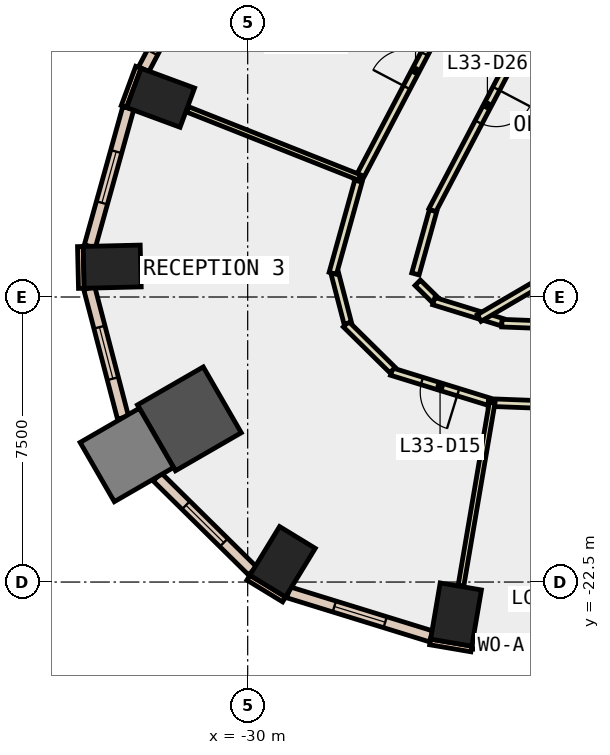
"""IFC4 building model, lengths in metres.
Left out: names, types, materials, properties, quantities, classifications, styles, units other than length and angle.
Written with IfcOpenShell. Run it as: python <this file> out.ifc"""

import sys

from ifc_helpers import new_model, si_unit, direction, frame, frame_2d, origin, origin_2d, place, context, subcontext, project, spatial, rectangle, extrude, element, fill, save


model = new_model("IFC4")
c1 = context("Model", 3, precision=1e-05, world=origin(), true_north=direction((0.0, 1.0)))
c2 = subcontext(c1, "Body", "Model", "MODEL_VIEW")
j1 = project(units=[si_unit("LENGTHUNIT", "METRE"), si_unit("PLANEANGLEUNIT", "RADIAN")], contexts=[c1])
p1 = place(None, origin())
s1 = spatial("IfcSite", under=j1, at=p1, CompositionType="ELEMENT")
p2 = place(p1, origin())
s2 = spatial("IfcBuilding", under=s1, at=p2, CompositionType="ELEMENT")
p3 = place(p2, frame((0.0, 0.0, 150.8)))
s3 = spatial("IfcBuildingStorey", under=s2, at=p3, CompositionType="ELEMENT", Elevation=150.8)
for number, where, z_axis, x_axis in (
    (1, (-24.518, -23.355, -0.4), (0.0, 0.0, 1.0), (-0.986, 0.168, 0.0)),
    (2, (-32.292, -9.758, -0.4), (0.0, 0.0, 1.0), (0.347, 0.938, 0.0)),
    (3, (-33.565, -14.202, -0.4), (0.0, 0.0, 1.0), (-0.024, 1.0, 0.0)),
):
    element("IfcColumn", number, at=place(p3, frame(where, z_axis=z_axis, x_axis=x_axis)), inside=s3, PredefinedType="COLUMN", context=c2, shape_type="SweptSolid", body=[
        extrude(rectangle(XDim=1.1, YDim=1.5, at=origin_2d()), origin(), (0.0, 0.0, 1.0), 4.2),
    ])
p4 = place(p3, frame((-31.535, -18.206, -0.4), z_axis=(0.0, 0.0, 1.0), x_axis=(0.866025403784, 0.5, 0.0)))
e4 = element("IfcColumn", 4, at=p4, inside=s3, PredefinedType="COLUMN", context=c2, shape_type="SweptSolid", body=[
    extrude(rectangle(XDim=2.0, YDim=2.0, at=origin_2d()), origin(), (0.0, 0.0, 1.0), 4.2),
])
p5 = place(p3, frame((-29.082, -21.967, -0.4), z_axis=(0.0, 0.0, 1.0), x_axis=(-0.853714435155, 0.520741455243, 0.0)))
e5 = element("IfcColumn", 5, at=p5, inside=s3, PredefinedType="COLUMN", context=c2, shape_type="SweptSolid", body=[
    extrude(rectangle(XDim=1.1, YDim=1.5, at=origin_2d()), origin(), (0.0, 0.0, 1.0), 4.2),
])
p6 = place(p3, frame((-33.18, -19.156, -0.4), z_axis=(0.0, 0.0, 1.0), x_axis=(0.866025403784, 0.5, 0.0)))
e6 = element("IfcColumn", 6, at=p6, inside=s3, PredefinedType="COLUMN", context=c2, shape_type="SweptSolid", body=[
    extrude(rectangle(XDim=1.8, YDim=1.8, at=origin_2d()), origin(), (0.0, 0.0, 1.0), 4.2),
])
p7 = place(p3, frame((-32.875, -8.956, 0.0), z_axis=(0.0, 0.0, 1.0), x_axis=(-0.346425160624, -0.93807761304, 0.0)))
e7 = element("IfcWall", 7, at=p7, inside=s3, PredefinedType="STANDARD", context=c2, shape_type="SweptSolid", body=[
    extrude(rectangle(XDim=1.1, YDim=0.15, at=frame_2d((0.55, 0.0))), origin(), (0.0, 0.0, 1.0), 3.8),
])
p8 = place(p3, frame((-25.199, -24.076, 0.0), z_axis=(0.0, 0.0, 1.0), x_axis=(0.985763338892, -0.168138751323, 0.0)))
e8 = element("IfcWall", 8, at=p8, inside=s3, PredefinedType="STANDARD", context=c2, shape_type="SweptSolid", body=[
    extrude(rectangle(XDim=1.101, YDim=0.15, at=frame_2d((0.55, 0.0))), origin(), (0.0, 0.0, 1.0), 3.8),
])
p9 = place(p3, frame((-34.403, -13.672, 0.0), z_axis=(0.0, 0.0, 1.0), x_axis=(0.023744690764, -0.999718055084, 0.0)))
e9 = element("IfcWall", 9, at=p9, inside=s3, PredefinedType="STANDARD", context=c2, shape_type="SweptSolid", body=[
    extrude(rectangle(XDim=1.1, YDim=0.15, at=frame_2d((0.55, 0.0))), origin(), (0.0, 0.0, 1.0), 3.8),
])
p10 = place(p3, frame((-29.981, -22.385, 0.0), z_axis=(0.0, 0.0, 1.0), x_axis=(0.854005542721, -0.520263907071, 0.0)))
e10 = element("IfcWall", 10, at=p10, inside=s3, PredefinedType="STANDARD", context=c2, shape_type="SweptSolid", body=[
    extrude(rectangle(XDim=1.099, YDim=0.15, at=frame_2d((0.55, 0.0))), origin(), (0.0, 0.0, 1.0), 3.8),
])
p11 = place(p3, frame((-24.09, -24.114, 0.0), z_axis=(0.0, 0.0, 1.0), x_axis=(0.999262356942, -0.038402369711, 0.0)))
e11 = element("IfcWall", 11, at=p11, inside=s3, PredefinedType="STANDARD", context=c2, shape_type="SweptSolid", body=[
    extrude(rectangle(XDim=7.317, YDim=0.3, at=frame_2d((3.659, 0.0))), origin(), (0.0, 0.0, 1.0), 3.8),
])
p12 = place(p11, frame((0.629, 0.0, 0.9)))
e12 = element("IfcOpeningElement", 12, at=p12, cuts=e11, PredefinedType="OPENING", context=c2, shape_type="SweptSolid", body=[
    extrude(rectangle(XDim=2.4, YDim=2.6, at=frame_2d((1.2, 1.3))), frame((0.0, 0.16, 0.0), z_axis=(0.0, -1.0, 0.0), x_axis=(1.0, 0.0, 0.0)), (0.0, 0.0, 1.0), 0.32),
])
p13 = place(p11, frame((4.288, 0.0, 0.9)))
e13 = element("IfcOpeningElement", 13, at=p13, cuts=e11, PredefinedType="OPENING", context=c2, shape_type="SweptSolid", body=[
    extrude(rectangle(XDim=2.4, YDim=2.6, at=frame_2d((1.2, 1.3))), frame((0.0, 0.16, 0.0), z_axis=(0.0, -1.0, 0.0), x_axis=(1.0, 0.0, 0.0)), (0.0, 0.0, 1.0), 0.32),
])
p14 = place(p3, frame((-29.951, -3.705, 0.0), z_axis=(0.0, 0.0, 1.0), x_axis=(-0.465104650407, -0.885255705528, 0.0)))
e14 = element("IfcWall", 14, at=p14, inside=s3, PredefinedType="STANDARD", context=c2, shape_type="SweptSolid", body=[
    extrude(rectangle(XDim=5.99, YDim=0.3, at=frame_2d((2.995, 0.0))), origin(), (0.0, 0.0, 1.0), 3.8),
])
p15 = place(p14, frame((0.498, 0.0, 0.9)))
e15 = element("IfcOpeningElement", 15, at=p15, cuts=e14, PredefinedType="OPENING", context=c2, shape_type="SweptSolid", body=[
    extrude(rectangle(XDim=2.0, YDim=2.6, at=frame_2d((1.0, 1.3))), frame((0.0, 0.16, 0.0), z_axis=(0.0, -1.0, 0.0), x_axis=(1.0, 0.0, 0.0)), (0.0, 0.0, 1.0), 0.32),
])
p16 = place(p14, frame((3.493, 0.0, 0.9)))
e16 = element("IfcOpeningElement", 16, at=p16, cuts=e14, PredefinedType="OPENING", context=c2, shape_type="SweptSolid", body=[
    extrude(rectangle(XDim=2.0, YDim=2.6, at=frame_2d((1.0, 1.3))), frame((0.0, 0.16, 0.0), z_axis=(0.0, -1.0, 0.0), x_axis=(1.0, 0.0, 0.0)), (0.0, 0.0, 1.0), 0.32),
])
p17 = place(p3, frame((-33.142, -10.029, 0.0), z_axis=(0.0, 0.0, 1.0), x_axis=(-0.26799398221, -0.963420585985, 0.0)))
e17 = element("IfcWall", 17, at=p17, inside=s3, PredefinedType="STANDARD", context=c2, shape_type="SweptSolid", body=[
    extrude(rectangle(XDim=3.776, YDim=0.3, at=frame_2d((1.888, 0.0))), origin(), (0.0, 0.0, 1.0), 3.8),
])
p18 = place(p17, frame((1.188, 0.0, 0.9)))
e18 = element("IfcOpeningElement", 18, at=p18, cuts=e17, PredefinedType="OPENING", context=c2, shape_type="SweptSolid", body=[
    extrude(rectangle(XDim=1.4, YDim=2.6, at=frame_2d((0.7, 1.3))), frame((0.0, 0.16, 0.0), z_axis=(0.0, -1.0, 0.0), x_axis=(1.0, 0.0, 0.0)), (0.0, 0.0, 1.0), 0.32),
])
p19 = place(p3, frame((-34.169, -14.766, 0.0), z_axis=(0.0, 0.0, 1.0), x_axis=(0.252255494168, -0.967660666588, 0.0)))
e19 = element("IfcWall", 19, at=p19, inside=s3, PredefinedType="STANDARD", context=c2, shape_type="SweptSolid", body=[
    extrude(rectangle(XDim=3.524, YDim=0.3, at=frame_2d((1.762, 0.0))), origin(), (0.0, 0.0, 1.0), 3.8),
])
p20 = place(p19, frame((1.062, 0.0, 0.9)))
e20 = element("IfcOpeningElement", 20, at=p20, cuts=e19, PredefinedType="OPENING", context=c2, shape_type="SweptSolid", body=[
    extrude(rectangle(XDim=1.4, YDim=2.6, at=frame_2d((0.7, 1.3))), frame((0.0, 0.16, 0.0), z_axis=(0.0, -1.0, 0.0), x_axis=(1.0, 0.0, 0.0)), (0.0, 0.0, 1.0), 0.32),
])
p21 = place(p3, frame((-32.381, -19.733, 0.0), z_axis=(0.0, 0.0, 1.0), x_axis=(0.712043314899, -0.702135540838, 0.0)))
e21 = element("IfcWall", 21, at=p21, inside=s3, PredefinedType="STANDARD", context=c2, shape_type="SweptSolid", body=[
    extrude(rectangle(XDim=3.524, YDim=0.3, at=frame_2d((1.762, 0.0))), origin(), (0.0, 0.0, 1.0), 3.8),
])
p22 = place(p21, frame((1.062, 0.0, 0.9)))
e22 = element("IfcOpeningElement", 22, at=p22, cuts=e21, PredefinedType="OPENING", context=c2, shape_type="SweptSolid", body=[
    extrude(rectangle(XDim=1.4, YDim=2.6, at=frame_2d((0.7, 1.3))), frame((0.0, 0.16, 0.0), z_axis=(0.0, -1.0, 0.0), x_axis=(1.0, 0.0, 0.0)), (0.0, 0.0, 1.0), 0.32),
])
p23 = place(p3, frame((-28.929, -22.77, 0.0), z_axis=(0.0, 0.0, 1.0), x_axis=(0.955473661147, -0.295076401723, 0.0)))
e23 = element("IfcWall", 23, at=p23, inside=s3, PredefinedType="STANDARD", context=c2, shape_type="SweptSolid", body=[
    extrude(rectangle(XDim=3.931, YDim=0.3, at=frame_2d((1.965, 0.0))), origin(), (0.0, 0.0, 1.0), 3.8),
])
p24 = place(p23, frame((1.266, 0.0, 0.9)))
e24 = element("IfcOpeningElement", 24, at=p24, cuts=e23, PredefinedType="OPENING", context=c2, shape_type="SweptSolid", body=[
    extrude(rectangle(XDim=1.4, YDim=2.6, at=frame_2d((0.7, 1.3))), frame((0.0, 0.16, 0.0), z_axis=(0.0, -1.0, 0.0), x_axis=(1.0, 0.0, 0.0)), (0.0, 0.0, 1.0), 0.32),
])
p25 = place(p3, frame((-22.241, -7.198, 0.0), z_axis=(0.0, 0.0, 1.0), x_axis=(-0.465089990515, -0.885263407536, 0.0)))
e25 = element("IfcWall", 25, at=p25, inside=s3, PredefinedType="PARTITIONING", context=c2, shape_type="SweptSolid", body=[
    extrude(rectangle(XDim=6.24, YDim=0.2, at=frame_2d((3.12, 0.0))), origin(), (0.0, 0.0, 1.0), 3.8),
])
p26 = place(p25, frame((2.62, 0.0, 0.0)))
e26 = element("IfcOpeningElement", 26, at=p26, cuts=e25, PredefinedType="OPENING", context=c2, shape_type="SweptSolid", body=[
    extrude(rectangle(XDim=1.0, YDim=2.1, at=frame_2d((0.5, 1.05))), frame((0.0, 0.11, 0.0), z_axis=(0.0, -1.0, 0.0), x_axis=(1.0, 0.0, 0.0)), (0.0, 0.0, 1.0), 0.22),
])
p27 = place(p3, frame((-25.123, -12.73, 0.0), z_axis=(0.0, 0.0, 1.0), x_axis=(-0.268139825244, -0.963380005044, 0.0)))
e27 = element("IfcWall", 27, at=p27, inside=s3, PredefinedType="PARTITIONING", context=c2, shape_type="SweptSolid", body=[
    extrude(rectangle(XDim=1.726, YDim=0.2, at=frame_2d((0.863, 0.0))), origin(), (0.0, 0.0, 1.0), 3.8),
])
p28 = place(p3, frame((-25.526, -14.626, 0.0), z_axis=(0.0, 0.0, 1.0), x_axis=(0.711758647644, -0.702424108003, 0.0)))
e28 = element("IfcWall", 28, at=p28, inside=s3, PredefinedType="PARTITIONING", context=c2, shape_type="SweptSolid", body=[
    extrude(rectangle(XDim=0.628, YDim=0.2, at=frame_2d((0.314, 0.0))), origin(), (0.0, 0.0, 1.0), 3.8),
])
p29 = place(p3, frame((-25.103, -15.108, 0.0), z_axis=(0.0, 0.0, 1.0), x_axis=(0.955420813731, -0.295247470251, 0.0)))
e29 = element("IfcWall", 29, at=p29, inside=s3, PredefinedType="PARTITIONING", context=c2, shape_type="SweptSolid", body=[
    extrude(rectangle(XDim=1.24, YDim=0.2, at=frame_2d((0.62, 0.0))), origin(), (0.0, 0.0, 1.0), 3.8),
])
p30 = place(p3, frame((-23.727, -15.532, 0.0), z_axis=(0.0, 0.0, 1.0), x_axis=(0.955237350621, -0.295840504289, 0.0)))
e30 = element("IfcWall", 30, at=p30, inside=s3, PredefinedType="PARTITIONING", context=c2, shape_type="SweptSolid", body=[
    extrude(rectangle(XDim=0.44, YDim=0.2, at=frame_2d((0.22, 0.0))), origin(), (0.0, 0.0, 1.0), 3.8),
])
p31 = place(p3, frame((-23.311, -15.688, 0.0), z_axis=(0.0, 0.0, 1.0), x_axis=(0.999262695969, -0.038393546916, 0.0)))
e31 = element("IfcWall", 31, at=p31, inside=s3, PredefinedType="PARTITIONING", context=c2, shape_type="SweptSolid", body=[
    extrude(rectangle(XDim=7.344, YDim=0.2, at=frame_2d((3.672, 0.0))), origin(), (0.0, 0.0, 1.0), 3.8),
])
p32 = place(p31, frame((3.172, 0.0, 0.0)))
e32 = element("IfcOpeningElement", 32, at=p32, cuts=e31, PredefinedType="OPENING", context=c2, shape_type="SweptSolid", body=[
    extrude(rectangle(XDim=1.0, YDim=2.1, at=frame_2d((0.5, 1.05))), frame((0.0, 0.11, 0.0), z_axis=(0.0, -1.0, 0.0), x_axis=(1.0, 0.0, 0.0)), (0.0, 0.0, 1.0), 0.22),
])
p33 = place(p3, frame((-27.106, -11.944, 0.0), z_axis=(0.0, 0.0, 1.0), x_axis=(0.464985599417, 0.885318243534, 0.0)))
e33 = element("IfcWall", 33, at=p33, inside=s3, PredefinedType="PARTITIONING", context=c2, shape_type="SweptSolid", body=[
    extrude(rectangle(XDim=6.402, YDim=0.2, at=frame_2d((3.201, 0.0))), origin(), (0.0, 0.0, 1.0), 3.8),
])
p34 = place(p33, frame((2.776, 0.0, 0.0)))
e34 = element("IfcOpeningElement", 34, at=p34, cuts=e33, PredefinedType="OPENING", context=c2, shape_type="SweptSolid", body=[
    extrude(rectangle(XDim=1.0, YDim=2.1, at=frame_2d((0.5, 1.05))), frame((0.0, 0.11, 0.0), z_axis=(0.0, -1.0, 0.0), x_axis=(1.0, 0.0, 0.0)), (0.0, 0.0, 1.0), 0.22),
])
p35 = place(p3, frame((-23.663, -17.75, 0.0), z_axis=(0.0, 0.0, 1.0), x_axis=(-0.955509582123, 0.294960062501, 0.0)))
e35 = element("IfcWall", 35, at=p35, inside=s3, PredefinedType="PARTITIONING", context=c2, shape_type="SweptSolid", body=[
    extrude(rectangle(XDim=2.668, YDim=0.2, at=frame_2d((1.334, 0.0))), origin(), (0.0, 0.0, 1.0), 3.8),
])
p36 = place(p35, frame((0.834, 0.0, 0.0)))
e36 = element("IfcOpeningElement", 36, at=p36, cuts=e35, PredefinedType="OPENING", context=c2, shape_type="SweptSolid", body=[
    extrude(rectangle(XDim=1.0, YDim=2.1, at=frame_2d((0.5, 1.05))), frame((0.0, 0.11, 0.0), z_axis=(0.0, -1.0, 0.0), x_axis=(1.0, 0.0, 0.0)), (0.0, 0.0, 1.0), 0.22),
])
p37 = place(p3, frame((-26.188, -16.922, 0.0), z_axis=(0.0, 0.0, 1.0), x_axis=(-0.712339678389, 0.701834868465, 0.0)))
e37 = element("IfcWall", 37, at=p37, inside=s3, PredefinedType="PARTITIONING", context=c2, shape_type="SweptSolid", body=[
    extrude(rectangle(XDim=1.72, YDim=0.2, at=frame_2d((0.86, 0.0))), origin(), (0.0, 0.0, 1.0), 3.8),
])
p38 = place(p3, frame((-27.367, -15.688, 0.0), z_axis=(0.0, 0.0, 1.0), x_axis=(-0.25159336549, 0.967833032316, 0.0)))
e38 = element("IfcWall", 38, at=p38, inside=s3, PredefinedType="PARTITIONING", context=c2, shape_type="SweptSolid", body=[
    extrude(rectangle(XDim=1.356, YDim=0.2, at=frame_2d((0.678, 0.0))), origin(), (0.0, 0.0, 1.0), 3.8),
])
p39 = place(p3, frame((-27.76, -14.376, 0.0), z_axis=(0.0, 0.0, 1.0), x_axis=(0.267909096687, 0.963444194498, 0.0)))
e39 = element("IfcWall", 39, at=p39, inside=s3, PredefinedType="PARTITIONING", context=c2, shape_type="SweptSolid", body=[
    extrude(rectangle(XDim=2.516, YDim=0.2, at=frame_2d((1.258, 0.0))), origin(), (0.0, 0.0, 1.0), 3.8),
])
p40 = place(p3, frame((-16.036, -18.069, 0.0), z_axis=(0.0, 0.0, 1.0), x_axis=(-0.999262637786, 0.038395061202, 0.0)))
e40 = element("IfcWall", 40, at=p40, inside=s3, PredefinedType="PARTITIONING", context=c2, shape_type="SweptSolid", body=[
    extrude(rectangle(XDim=7.637, YDim=0.2, at=frame_2d((3.818, 0.0))), origin(), (0.0, 0.0, 1.0), 3.8),
])
p41 = place(p40, frame((3.318, 0.0, 0.0)))
e41 = element("IfcOpeningElement", 41, at=p41, cuts=e40, PredefinedType="OPENING", context=c2, shape_type="SweptSolid", body=[
    extrude(rectangle(XDim=1.0, YDim=2.1, at=frame_2d((0.5, 1.05))), frame((0.0, 0.11, 0.0), z_axis=(0.0, -1.0, 0.0), x_axis=(1.0, 0.0, 0.0)), (0.0, 0.0, 1.0), 0.22),
])
p42 = place(p3, frame((-16.803, -11.397, 0.0), z_axis=(0.0, 0.0, 1.0), x_axis=(-0.863203941699, -0.504855380318, 0.0)))
e42 = element("IfcWall", 42, at=p42, inside=s3, PredefinedType="PARTITIONING", context=c2, shape_type="SweptSolid", body=[
    extrude(rectangle(XDim=8.232, YDim=0.2, at=frame_2d((4.116, 0.0))), origin(), (0.0, 0.0, 1.0), 3.8),
])
p43 = place(p3, frame((-27.059, -11.855, 0.0), z_axis=(0.0, 0.0, 1.0), x_axis=(-0.92964843089, 0.368447818481, 0.0)))
e43 = element("IfcWall", 43, at=p43, inside=s3, PredefinedType="PARTITIONING", context=c2, shape_type="SweptSolid", body=[
    extrude(rectangle(XDim=4.866, YDim=0.15, at=frame_2d((2.433, 0.0))), origin(), (0.0, 0.0, 1.0), 3.8),
])
p44 = place(p3, frame((-23.567, -17.779, 0.0), z_axis=(0.0, 0.0, 1.0), x_axis=(-0.168027663896, -0.985782280306, 0.0)))
e44 = element("IfcWall", 44, at=p44, inside=s3, PredefinedType="PARTITIONING", context=c2, shape_type="SweptSolid", body=[
    extrude(rectangle(XDim=4.886, YDim=0.15, at=frame_2d((2.443, 0.0))), origin(), (0.0, 0.0, 1.0), 3.8),
])
p45 = place(p12, origin())
e45 = element("IfcWindow", 45, at=p45, inside=s3, PartitioningType="SINGLE_PANEL", PredefinedType="WINDOW", context=c2, shape_type="SweptSolid", body=[
    extrude(rectangle(XDim=2.4, YDim=2.6, at=frame_2d((1.2, 1.3))), frame((0.0, 0.03, 0.0), z_axis=(0.0, -1.0, 0.0), x_axis=(1.0, 0.0, 0.0)), (0.0, 0.0, 1.0), 0.06),
])
fill(e12, e45)
p46 = place(p16, origin())
e46 = element("IfcWindow", 46, at=p46, inside=s3, PartitioningType="SINGLE_PANEL", PredefinedType="WINDOW", context=c2, shape_type="SweptSolid", body=[
    extrude(rectangle(XDim=2.0, YDim=2.6, at=frame_2d((1.0, 1.3))), frame((0.0, 0.03, 0.0), z_axis=(0.0, -1.0, 0.0), x_axis=(1.0, 0.0, 0.0)), (0.0, 0.0, 1.0), 0.06),
])
fill(e16, e46)
p47 = place(p18, origin())
e47 = element("IfcWindow", 47, at=p47, inside=s3, PartitioningType="SINGLE_PANEL", PredefinedType="WINDOW", context=c2, shape_type="SweptSolid", body=[
    extrude(rectangle(XDim=1.4, YDim=2.6, at=frame_2d((0.7, 1.3))), frame((0.0, 0.03, 0.0), z_axis=(0.0, -1.0, 0.0), x_axis=(1.0, 0.0, 0.0)), (0.0, 0.0, 1.0), 0.06),
])
fill(e18, e47)
p48 = place(p20, origin())
e48 = element("IfcWindow", 48, at=p48, inside=s3, PartitioningType="SINGLE_PANEL", PredefinedType="WINDOW", context=c2, shape_type="SweptSolid", body=[
    extrude(rectangle(XDim=1.4, YDim=2.6, at=frame_2d((0.7, 1.3))), frame((0.0, 0.03, 0.0), z_axis=(0.0, -1.0, 0.0), x_axis=(1.0, 0.0, 0.0)), (0.0, 0.0, 1.0), 0.06),
])
fill(e20, e48)
p49 = place(p22, origin())
e49 = element("IfcWindow", 49, at=p49, inside=s3, PartitioningType="SINGLE_PANEL", PredefinedType="WINDOW", context=c2, shape_type="SweptSolid", body=[
    extrude(rectangle(XDim=1.4, YDim=2.6, at=frame_2d((0.7, 1.3))), frame((0.0, 0.03, 0.0), z_axis=(0.0, -1.0, 0.0), x_axis=(1.0, 0.0, 0.0)), (0.0, 0.0, 1.0), 0.06),
])
fill(e22, e49)
p50 = place(p24, origin())
e50 = element("IfcWindow", 50, at=p50, inside=s3, PartitioningType="SINGLE_PANEL", PredefinedType="WINDOW", context=c2, shape_type="SweptSolid", body=[
    extrude(rectangle(XDim=1.4, YDim=2.6, at=frame_2d((0.7, 1.3))), frame((0.0, 0.03, 0.0), z_axis=(0.0, -1.0, 0.0), x_axis=(1.0, 0.0, 0.0)), (0.0, 0.0, 1.0), 0.06),
])
fill(e24, e50)
p51 = place(p34, origin())
e51 = element("IfcDoor", 51, at=p51, inside=s3, OperationType="SINGLE_SWING_LEFT", PredefinedType="DOOR", context=c2, shape_type="SweptSolid", body=[
    extrude(rectangle(XDim=1.0, YDim=2.1, at=frame_2d((0.5, 1.05))), frame((0.0, 0.025, 0.0), z_axis=(0.0, -1.0, 0.0), x_axis=(1.0, 0.0, 0.0)), (0.0, 0.0, 1.0), 0.05),
])
fill(e34, e51)
p52 = place(p36, origin())
e52 = element("IfcDoor", 52, at=p52, inside=s3, OperationType="SINGLE_SWING_LEFT", PredefinedType="DOOR", context=c2, shape_type="SweptSolid", body=[
    extrude(rectangle(XDim=1.0, YDim=2.1, at=frame_2d((0.5, 1.05))), frame((0.0, 0.025, 0.0), z_axis=(0.0, -1.0, 0.0), x_axis=(1.0, 0.0, 0.0)), (0.0, 0.0, 1.0), 0.05),
])
fill(e36, e52)
p53 = place(p26, origin())
e53 = element("IfcDoor", 53, at=p53, inside=s3, OperationType="SINGLE_SWING_LEFT", PredefinedType="DOOR", context=c2, shape_type="SweptSolid", body=[
    extrude(rectangle(XDim=1.0, YDim=2.1, at=frame_2d((0.5, 1.05))), frame((0.0, 0.025, 0.0), z_axis=(0.0, -1.0, 0.0), x_axis=(1.0, 0.0, 0.0)), (0.0, 0.0, 1.0), 0.05),
])
fill(e26, e53)
save(model, sys.argv[1])
